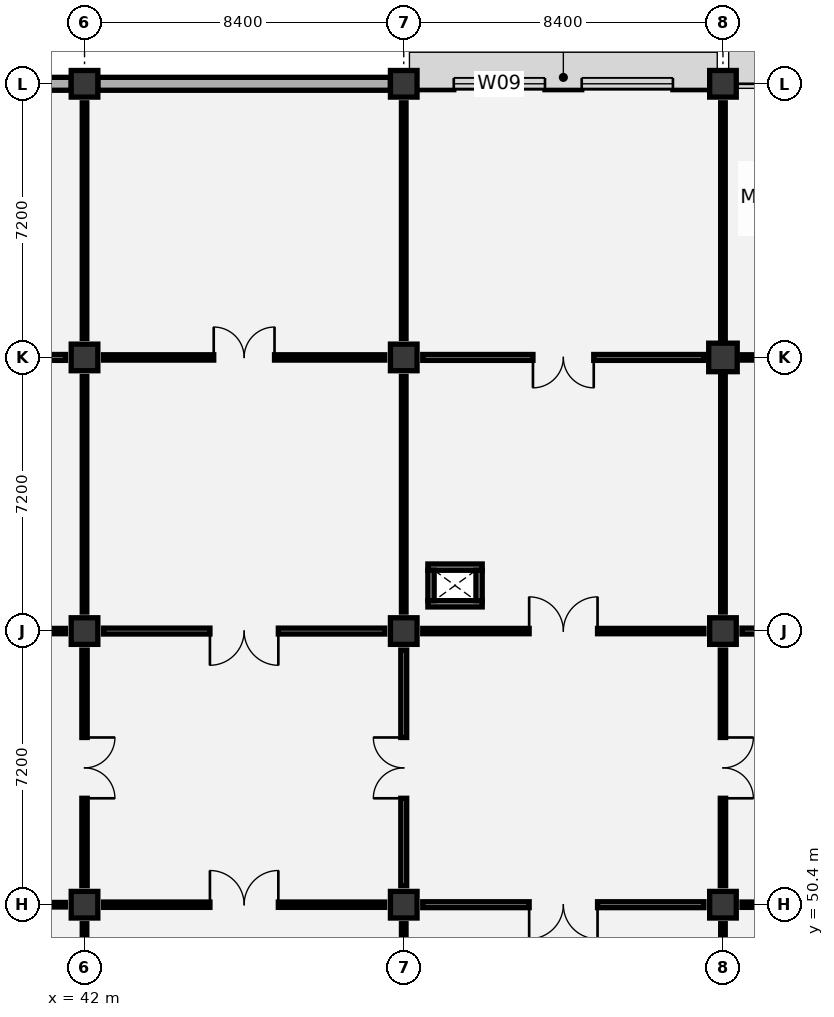
"""IFC4 building model, lengths in metres.
Left out: names, types, materials, properties, quantities, classifications, styles, units other than length and angle.
Written with IfcOpenShell. Run it as: python <this file> out.ifc"""

import sys

from ifc_helpers import new_model, si_unit, direction, frame, frame_2d, origin, origin_2d, place, context, subcontext, project, spatial, rectangle, circle, extrude, element, fill, save


model = new_model("IFC4")
c1 = context("Model", 3, precision=1e-05, world=origin(), true_north=direction((0.0, 1.0)))
c2 = subcontext(c1, "Body", "Model", "MODEL_VIEW")
j1 = project(units=[si_unit("LENGTHUNIT", "METRE"), si_unit("PLANEANGLEUNIT", "RADIAN")], contexts=[c1])
p1 = place(None, origin())
s1 = spatial("IfcSite", under=j1, at=p1, CompositionType="ELEMENT")
p2 = place(p1, origin())
s2 = spatial("IfcBuilding", under=s1, at=p2, CompositionType="ELEMENT")
p3 = place(p2, frame((0.0, 0.0, 6.0)))
s3 = spatial("IfcBuildingStorey", under=s2, at=p3, CompositionType="ELEMENT", Elevation=6.0)
for number, where, z_axis, x_axis in (
    (1, (42.0, 50.4, 0.0), (0.0, 0.0, 1.0), (1.0, 0.0, 0.0)),
    (2, (42.0, 57.6, 0.0), (0.0, 0.0, 1.0), (1.0, 0.0, 0.0)),
    (3, (42.0, 64.8, 0.0), (0.0, 0.0, 1.0), (1.0, 0.0, 0.0)),
    (4, (42.0, 72.0, 0.0), (0.0, 0.0, 1.0), (1.0, 0.0, 0.0)),
    (5, (50.4, 50.4, 0.0), (0.0, 0.0, 1.0), (1.0, 0.0, 0.0)),
    (6, (50.4, 57.6, 0.0), (0.0, 0.0, 1.0), (1.0, 0.0, 0.0)),
    (7, (50.4, 64.8, 0.0), (0.0, 0.0, 1.0), (1.0, 0.0, 0.0)),
    (8, (50.4, 72.0, 0.0), (0.0, 0.0, 1.0), (1.0, 0.0, 0.0)),
    (9, (58.8, 50.4, 0.0), (0.0, 0.0, 1.0), (1.0, 0.0, 0.0)),
    (10, (58.8, 57.6, 0.0), (0.0, 0.0, 1.0), (1.0, 0.0, 0.0)),
):
    element("IfcColumn", number, at=place(p3, frame(where, z_axis=z_axis, x_axis=x_axis)), inside=s3, PredefinedType="COLUMN", context=c2, shape_type="SweptSolid", body=[
        extrude(rectangle(XDim=0.7, YDim=0.7, at=origin_2d()), origin(), (0.0, 0.0, 1.0), 5.4),
    ])
p4 = place(p3, frame((58.8, 64.8, 0.0), z_axis=(0.0, 0.0, 1.0), x_axis=(1.0, 0.0, 0.0)))
e11 = element("IfcColumn", 11, at=p4, inside=s3, PredefinedType="COLUMN", context=c2, shape_type="SweptSolid", body=[
    extrude(circle(Radius=0.375, at=origin_2d()), origin(), (0.0, 0.0, 1.0), 5.4),
])
p5 = place(p3, frame((58.8, 72.0, 0.0), z_axis=(0.0, 0.0, 1.0), x_axis=(1.0, 0.0, 0.0)))
e12 = element("IfcColumn", 12, at=p5, inside=s3, PredefinedType="COLUMN", context=c2, shape_type="SweptSolid", body=[
    extrude(rectangle(XDim=0.7, YDim=0.7, at=origin_2d()), origin(), (0.0, 0.0, 1.0), 5.4),
])
for number, where, z_axis, x_axis in (
    (13, (33.95, 72.0, 0.0), (0.0, 0.0, 1.0), (1.0, 0.0, 0.0)),
    (14, (42.35, 72.0, 0.0), (0.0, 0.0, 1.0), (1.0, 0.0, 0.0)),
):
    element("IfcWall", number, at=place(p3, frame(where, z_axis=z_axis, x_axis=x_axis)), inside=s3, PredefinedType="SOLIDWALL", context=c2, shape_type="SweptSolid", body=[
        extrude(rectangle(XDim=7.7, YDim=0.34, at=frame_2d((3.85, 0.0))), origin(), (0.0, 0.0, 1.0), 4.42),
    ])
p6 = place(p3, frame((50.75, 72.0, 0.0), z_axis=(0.0, 0.0, 1.0), x_axis=(1.0, 0.0, 0.0)))
e15 = element("IfcWall", 15, at=p6, inside=s3, PredefinedType="SOLIDWALL", context=c2, shape_type="SweptSolid", body=[
    extrude(rectangle(XDim=7.7, YDim=0.31, at=frame_2d((3.85, 0.0))), origin(), (0.0, 0.0, 1.0), 4.42),
])
p7 = place(p6, frame((0.967, 0.0, 0.9)))
e16 = element("IfcOpeningElement", 16, at=p7, cuts=e15, PredefinedType="OPENING", context=c2, shape_type="SweptSolid", body=[
    extrude(rectangle(XDim=2.4, YDim=2.1, at=frame_2d((1.2, 1.05))), frame((0.0, 0.165, 0.0), z_axis=(0.0, -1.0, 0.0), x_axis=(1.0, 0.0, 0.0)), (0.0, 0.0, 1.0), 0.33),
])
p8 = place(p6, frame((4.333, 0.0, 0.9)))
e17 = element("IfcOpeningElement", 17, at=p8, cuts=e15, PredefinedType="OPENING", context=c2, shape_type="SweptSolid", body=[
    extrude(rectangle(XDim=2.4, YDim=2.1, at=frame_2d((1.2, 1.05))), frame((0.0, 0.165, 0.0), z_axis=(0.0, -1.0, 0.0), x_axis=(1.0, 0.0, 0.0)), (0.0, 0.0, 1.0), 0.33),
])
for number, where, z_axis, x_axis in (
    (18, (51.035, 58.317, 0.0), (0.0, 0.0, 1.0), (1.0, 0.0, 0.0)),
    (19, (51.035, 59.282, 0.0), (0.0, 0.0, 1.0), (1.0, 0.0, 0.0)),
):
    element("IfcWall", number, at=place(p3, frame(where, z_axis=z_axis, x_axis=x_axis)), inside=s3, PredefinedType="PARTITIONING", context=c2, shape_type="SweptSolid", body=[
        extrude(rectangle(XDim=1.43, YDim=0.165, at=frame_2d((0.715, 0.0))), origin(), (0.0, 0.0, 1.0), 5.075),
    ])
for number, where, z_axis, x_axis in (
    (20, (51.117, 58.4, 0.0), (0.0, 0.0, 1.0), (0.0, 1.0, 0.0)),
    (21, (52.383, 58.4, 0.0), (0.0, 0.0, 1.0), (0.0, 1.0, 0.0)),
):
    element("IfcWall", number, at=place(p3, frame(where, z_axis=z_axis, x_axis=x_axis)), inside=s3, PredefinedType="PARTITIONING", context=c2, shape_type="SweptSolid", body=[
        extrude(rectangle(XDim=0.8, YDim=0.165, at=frame_2d((0.4, 0.0))), origin(), (0.0, 0.0, 1.0), 5.075),
    ])
p9 = place(p3, frame((42.0, 43.7, 0.0), z_axis=(0.0, 0.0, 1.0), x_axis=(0.0, 1.0, 0.0)))
e22 = element("IfcWall", 22, at=p9, inside=s3, PredefinedType="PARTITIONING", context=c2, shape_type="SweptSolid", body=[
    extrude(rectangle(XDim=6.2, YDim=0.12, at=frame_2d((3.1, 0.0))), origin(), (0.0, 0.0, 1.0), 4.67),
])
p10 = place(p3, frame((34.1, 50.4, 0.0), z_axis=(0.0, 0.0, 1.0), x_axis=(1.0, 0.0, 0.0)))
e23 = element("IfcWall", 23, at=p10, inside=s3, PredefinedType="PARTITIONING", context=c2, shape_type="SweptSolid", body=[
    extrude(rectangle(XDim=7.4, YDim=0.12, at=frame_2d((3.7, 0.0))), origin(), (0.0, 0.0, 1.0), 4.27),
])
p11 = place(p3, frame((42.0, 50.9, 0.0), z_axis=(0.0, 0.0, 1.0), x_axis=(0.0, 1.0, 0.0)))
e24 = element("IfcWall", 24, at=p11, inside=s3, PredefinedType="PARTITIONING", context=c2, shape_type="SweptSolid", body=[
    extrude(rectangle(XDim=6.2, YDim=0.14, at=frame_2d((3.1, 0.0))), origin(), (0.0, 0.0, 1.0), 4.32),
])
p12 = place(p11, frame((2.3, 0.0, 0.0)))
e25 = element("IfcOpeningElement", 25, at=p12, cuts=e24, PredefinedType="OPENING", context=c2, shape_type="SweptSolid", body=[
    extrude(rectangle(XDim=1.6, YDim=2.2, at=frame_2d((0.8, 1.1))), frame((0.0, 0.08, 0.0), z_axis=(0.0, -1.0, 0.0), x_axis=(1.0, 0.0, 0.0)), (0.0, 0.0, 1.0), 0.16),
])
p13 = place(p3, frame((34.1, 57.6, 0.0), z_axis=(0.0, 0.0, 1.0), x_axis=(1.0, 0.0, 0.0)))
e26 = element("IfcWall", 26, at=p13, inside=s3, PredefinedType="PARTITIONING", context=c2, shape_type="SweptSolid", body=[
    extrude(rectangle(XDim=7.4, YDim=0.14, at=frame_2d((3.7, 0.0))), origin(), (0.0, 0.0, 1.0), 4.27),
])
p14 = place(p13, frame((2.8, 0.0, 0.0)))
e27 = element("IfcOpeningElement", 27, at=p14, cuts=e26, PredefinedType="OPENING", context=c2, shape_type="SweptSolid", body=[
    extrude(rectangle(XDim=1.8, YDim=2.25, at=frame_2d((0.9, 1.125))), frame((0.0, 0.08, 0.0), z_axis=(0.0, -1.0, 0.0), x_axis=(1.0, 0.0, 0.0)), (0.0, 0.0, 1.0), 0.16),
])
p15 = place(p3, frame((42.0, 58.1, 0.0), z_axis=(0.0, 0.0, 1.0), x_axis=(0.0, 1.0, 0.0)))
e28 = element("IfcWall", 28, at=p15, inside=s3, PredefinedType="PARTITIONING", context=c2, shape_type="SweptSolid", body=[
    extrude(rectangle(XDim=6.2, YDim=0.12, at=frame_2d((3.1, 0.0))), origin(), (0.0, 0.0, 1.0), 4.78),
])
p16 = place(p3, frame((34.1, 64.8, 0.0), z_axis=(0.0, 0.0, 1.0), x_axis=(1.0, 0.0, 0.0)))
e29 = element("IfcWall", 29, at=p16, inside=s3, PredefinedType="PARTITIONING", context=c2, shape_type="SweptSolid", body=[
    extrude(rectangle(XDim=7.4, YDim=0.155, at=frame_2d((3.7, 0.0))), origin(), (0.0, 0.0, 1.0), 4.27),
])
p17 = place(p16, frame((2.9, 0.0, 0.0)))
e30 = element("IfcOpeningElement", 30, at=p17, cuts=e29, PredefinedType="OPENING", context=c2, shape_type="SweptSolid", body=[
    extrude(rectangle(XDim=1.6, YDim=2.2, at=frame_2d((0.8, 1.1))), frame((0.0, 0.087, 0.0), z_axis=(0.0, -1.0, 0.0), x_axis=(1.0, 0.0, 0.0)), (0.0, 0.0, 1.0), 0.175),
])
for number, where, z_axis, x_axis in (
    (31, (42.0, 65.3, 0.0), (0.0, 0.0, 1.0), (0.0, 1.0, 0.0)),
    (32, (50.4, 43.7, 0.0), (0.0, 0.0, 1.0), (0.0, 1.0, 0.0)),
):
    element("IfcWall", number, at=place(p3, frame(where, z_axis=z_axis, x_axis=x_axis)), inside=s3, PredefinedType="PARTITIONING", context=c2, shape_type="SweptSolid", body=[
        extrude(rectangle(XDim=6.2, YDim=0.12, at=frame_2d((3.1, 0.0))), origin(), (0.0, 0.0, 1.0), 4.32),
    ])
p18 = place(p3, frame((42.5, 50.4, 0.0), z_axis=(0.0, 0.0, 1.0), x_axis=(1.0, 0.0, 0.0)))
e33 = element("IfcWall", 33, at=p18, inside=s3, PredefinedType="PARTITIONING", context=c2, shape_type="SweptSolid", body=[
    extrude(rectangle(XDim=7.4, YDim=0.14, at=frame_2d((3.7, 0.0))), origin(), (0.0, 0.0, 1.0), 4.27),
])
p19 = place(p18, frame((2.8, 0.0, 0.0)))
e34 = element("IfcOpeningElement", 34, at=p19, cuts=e33, PredefinedType="OPENING", context=c2, shape_type="SweptSolid", body=[
    extrude(rectangle(XDim=1.8, YDim=2.25, at=frame_2d((0.9, 1.125))), frame((0.0, 0.08, 0.0), z_axis=(0.0, -1.0, 0.0), x_axis=(1.0, 0.0, 0.0)), (0.0, 0.0, 1.0), 0.16),
])
p20 = place(p3, frame((50.4, 50.9, 0.0), z_axis=(0.0, 0.0, 1.0), x_axis=(0.0, 1.0, 0.0)))
e35 = element("IfcWall", 35, at=p20, inside=s3, PredefinedType="PARTITIONING", context=c2, shape_type="SweptSolid", body=[
    extrude(rectangle(XDim=6.2, YDim=0.155, at=frame_2d((3.1, 0.0))), origin(), (0.0, 0.0, 1.0), 4.78),
])
p21 = place(p20, frame((2.3, 0.0, 0.0)))
e36 = element("IfcOpeningElement", 36, at=p21, cuts=e35, PredefinedType="OPENING", context=c2, shape_type="SweptSolid", body=[
    extrude(rectangle(XDim=1.6, YDim=2.2, at=frame_2d((0.8, 1.1))), frame((0.0, 0.087, 0.0), z_axis=(0.0, -1.0, 0.0), x_axis=(1.0, 0.0, 0.0)), (0.0, 0.0, 1.0), 0.175),
])
p22 = place(p3, frame((42.5, 57.6, 0.0), z_axis=(0.0, 0.0, 1.0), x_axis=(1.0, 0.0, 0.0)))
e37 = element("IfcWall", 37, at=p22, inside=s3, PredefinedType="PARTITIONING", context=c2, shape_type="SweptSolid", body=[
    extrude(rectangle(XDim=7.4, YDim=0.155, at=frame_2d((3.7, 0.0))), origin(), (0.0, 0.0, 1.0), 4.27),
])
p23 = place(p22, frame((2.8, 0.0, 0.0)))
e38 = element("IfcOpeningElement", 38, at=p23, cuts=e37, PredefinedType="OPENING", context=c2, shape_type="SweptSolid", body=[
    extrude(rectangle(XDim=1.8, YDim=2.25, at=frame_2d((0.9, 1.125))), frame((0.0, 0.087, 0.0), z_axis=(0.0, -1.0, 0.0), x_axis=(1.0, 0.0, 0.0)), (0.0, 0.0, 1.0), 0.175),
])
p24 = place(p3, frame((50.4, 58.1, 0.0), z_axis=(0.0, 0.0, 1.0), x_axis=(0.0, 1.0, 0.0)))
e39 = element("IfcWall", 39, at=p24, inside=s3, PredefinedType="PARTITIONING", context=c2, shape_type="SweptSolid", body=[
    extrude(rectangle(XDim=6.2, YDim=0.12, at=frame_2d((3.1, 0.0))), origin(), (0.0, 0.0, 1.0), 4.32),
])
p25 = place(p3, frame((42.5, 64.8, 0.0), z_axis=(0.0, 0.0, 1.0), x_axis=(1.0, 0.0, 0.0)))
e40 = element("IfcWall", 40, at=p25, inside=s3, PredefinedType="PARTITIONING", context=c2, shape_type="SweptSolid", body=[
    extrude(rectangle(XDim=7.4, YDim=0.14, at=frame_2d((3.7, 0.0))), origin(), (0.0, 0.0, 1.0), 4.27),
])
p26 = place(p25, frame((2.9, 0.0, 0.0)))
e41 = element("IfcOpeningElement", 41, at=p26, cuts=e40, PredefinedType="OPENING", context=c2, shape_type="SweptSolid", body=[
    extrude(rectangle(XDim=1.6, YDim=2.2, at=frame_2d((0.8, 1.1))), frame((0.0, 0.08, 0.0), z_axis=(0.0, -1.0, 0.0), x_axis=(1.0, 0.0, 0.0)), (0.0, 0.0, 1.0), 0.16),
])
p27 = place(p3, frame((50.4, 65.3, 0.0), z_axis=(0.0, 0.0, 1.0), x_axis=(0.0, 1.0, 0.0)))
e42 = element("IfcWall", 42, at=p27, inside=s3, PredefinedType="PARTITIONING", context=c2, shape_type="SweptSolid", body=[
    extrude(rectangle(XDim=6.2, YDim=0.12, at=frame_2d((3.1, 0.0))), origin(), (0.0, 0.0, 1.0), 4.57),
])
p28 = place(p3, frame((58.8, 43.7, 0.0), z_axis=(0.0, 0.0, 1.0), x_axis=(0.0, 1.0, 0.0)))
e43 = element("IfcWall", 43, at=p28, inside=s3, PredefinedType="PARTITIONING", context=c2, shape_type="SweptSolid", body=[
    extrude(rectangle(XDim=6.2, YDim=0.12, at=frame_2d((3.1, 0.0))), origin(), (0.0, 0.0, 1.0), 4.78),
])
p29 = place(p3, frame((50.9, 50.4, 0.0), z_axis=(0.0, 0.0, 1.0), x_axis=(1.0, 0.0, 0.0)))
e44 = element("IfcWall", 44, at=p29, inside=s3, PredefinedType="PARTITIONING", context=c2, shape_type="SweptSolid", body=[
    extrude(rectangle(XDim=7.4, YDim=0.155, at=frame_2d((3.7, 0.0))), origin(), (0.0, 0.0, 1.0), 4.27),
])
p30 = place(p29, frame((2.8, 0.0, 0.0)))
e45 = element("IfcOpeningElement", 45, at=p30, cuts=e44, PredefinedType="OPENING", context=c2, shape_type="SweptSolid", body=[
    extrude(rectangle(XDim=1.8, YDim=2.25, at=frame_2d((0.9, 1.125))), frame((0.0, 0.087, 0.0), z_axis=(0.0, -1.0, 0.0), x_axis=(1.0, 0.0, 0.0)), (0.0, 0.0, 1.0), 0.175),
])
p31 = place(p3, frame((58.8, 50.9, 0.0), z_axis=(0.0, 0.0, 1.0), x_axis=(0.0, 1.0, 0.0)))
e46 = element("IfcWall", 46, at=p31, inside=s3, PredefinedType="PARTITIONING", context=c2, shape_type="SweptSolid", body=[
    extrude(rectangle(XDim=6.2, YDim=0.14, at=frame_2d((3.1, 0.0))), origin(), (0.0, 0.0, 1.0), 4.32),
])
p32 = place(p31, frame((2.3, 0.0, 0.0)))
e47 = element("IfcOpeningElement", 47, at=p32, cuts=e46, PredefinedType="OPENING", context=c2, shape_type="SweptSolid", body=[
    extrude(rectangle(XDim=1.6, YDim=2.2, at=frame_2d((0.8, 1.1))), frame((0.0, 0.08, 0.0), z_axis=(0.0, -1.0, 0.0), x_axis=(1.0, 0.0, 0.0)), (0.0, 0.0, 1.0), 0.16),
])
p33 = place(p3, frame((50.9, 57.6, 0.0), z_axis=(0.0, 0.0, 1.0), x_axis=(1.0, 0.0, 0.0)))
e48 = element("IfcWall", 48, at=p33, inside=s3, PredefinedType="PARTITIONING", context=c2, shape_type="SweptSolid", body=[
    extrude(rectangle(XDim=7.4, YDim=0.14, at=frame_2d((3.7, 0.0))), origin(), (0.0, 0.0, 1.0), 4.27),
])
p34 = place(p33, frame((2.8, 0.0, 0.0)))
e49 = element("IfcOpeningElement", 49, at=p34, cuts=e48, PredefinedType="OPENING", context=c2, shape_type="SweptSolid", body=[
    extrude(rectangle(XDim=1.8, YDim=2.25, at=frame_2d((0.9, 1.125))), frame((0.0, 0.08, 0.0), z_axis=(0.0, -1.0, 0.0), x_axis=(1.0, 0.0, 0.0)), (0.0, 0.0, 1.0), 0.16),
])
p35 = place(p3, frame((58.8, 58.1, 0.0), z_axis=(0.0, 0.0, 1.0), x_axis=(0.0, 1.0, 0.0)))
e50 = element("IfcWall", 50, at=p35, inside=s3, PredefinedType="PARTITIONING", context=c2, shape_type="SweptSolid", body=[
    extrude(rectangle(XDim=6.2, YDim=0.12, at=frame_2d((3.1, 0.0))), origin(), (0.0, 0.0, 1.0), 4.57),
])
p36 = place(p3, frame((50.9, 64.8, 0.0), z_axis=(0.0, 0.0, 1.0), x_axis=(1.0, 0.0, 0.0)))
e51 = element("IfcWall", 51, at=p36, inside=s3, PredefinedType="PARTITIONING", context=c2, shape_type="SweptSolid", body=[
    extrude(rectangle(XDim=7.4, YDim=0.155, at=frame_2d((3.7, 0.0))), origin(), (0.0, 0.0, 1.0), 4.27),
])
p37 = place(p36, frame((2.9, 0.0, 0.0)))
e52 = element("IfcOpeningElement", 52, at=p37, cuts=e51, PredefinedType="OPENING", context=c2, shape_type="SweptSolid", body=[
    extrude(rectangle(XDim=1.6, YDim=2.2, at=frame_2d((0.8, 1.1))), frame((0.0, 0.087, 0.0), z_axis=(0.0, -1.0, 0.0), x_axis=(1.0, 0.0, 0.0)), (0.0, 0.0, 1.0), 0.175),
])
p38 = place(p3, frame((58.8, 65.3, 0.0), z_axis=(0.0, 0.0, 1.0), x_axis=(0.0, 1.0, 0.0)))
e53 = element("IfcWall", 53, at=p38, inside=s3, PredefinedType="PARTITIONING", context=c2, shape_type="SweptSolid", body=[
    extrude(rectangle(XDim=6.2, YDim=0.12, at=frame_2d((3.1, 0.0))), origin(), (0.0, 0.0, 1.0), 4.32),
])
p39 = place(p3, frame((59.3, 50.4, 0.0), z_axis=(0.0, 0.0, 1.0), x_axis=(1.0, 0.0, 0.0)))
e54 = element("IfcWall", 54, at=p39, inside=s3, PredefinedType="PARTITIONING", context=c2, shape_type="SweptSolid", body=[
    extrude(rectangle(XDim=7.4, YDim=0.14, at=frame_2d((3.7, 0.0))), origin(), (0.0, 0.0, 1.0), 4.27),
])
p40 = place(p39, frame((2.9, 0.0, 0.0)))
e55 = element("IfcOpeningElement", 55, at=p40, cuts=e54, PredefinedType="OPENING", context=c2, shape_type="SweptSolid", body=[
    extrude(rectangle(XDim=1.6, YDim=2.2, at=frame_2d((0.8, 1.1))), frame((0.0, 0.08, 0.0), z_axis=(0.0, -1.0, 0.0), x_axis=(1.0, 0.0, 0.0)), (0.0, 0.0, 1.0), 0.16),
])
p41 = place(p3, frame((59.3, 57.6, 0.0), z_axis=(0.0, 0.0, 1.0), x_axis=(1.0, 0.0, 0.0)))
e56 = element("IfcWall", 56, at=p41, inside=s3, PredefinedType="PARTITIONING", context=c2, shape_type="SweptSolid", body=[
    extrude(rectangle(XDim=7.4, YDim=0.155, at=frame_2d((3.7, 0.0))), origin(), (0.0, 0.0, 1.0), 4.27),
])
p42 = place(p41, frame((2.9, 0.0, 0.0)))
e57 = element("IfcOpeningElement", 57, at=p42, cuts=e56, PredefinedType="OPENING", context=c2, shape_type="SweptSolid", body=[
    extrude(rectangle(XDim=1.6, YDim=2.2, at=frame_2d((0.8, 1.1))), frame((0.0, 0.087, 0.0), z_axis=(0.0, -1.0, 0.0), x_axis=(1.0, 0.0, 0.0)), (0.0, 0.0, 1.0), 0.175),
])
p43 = place(p3, frame((59.3, 64.8, 0.0), z_axis=(0.0, 0.0, 1.0), x_axis=(1.0, 0.0, 0.0)))
e58 = element("IfcWall", 58, at=p43, inside=s3, PredefinedType="PARTITIONING", context=c2, shape_type="SweptSolid", body=[
    extrude(rectangle(XDim=7.4, YDim=0.14, at=frame_2d((3.7, 0.0))), origin(), (0.0, 0.0, 1.0), 4.27),
])
p44 = place(p43, frame((2.8, 0.0, 0.0)))
e59 = element("IfcOpeningElement", 59, at=p44, cuts=e58, PredefinedType="OPENING", context=c2, shape_type="SweptSolid", body=[
    extrude(rectangle(XDim=1.8, YDim=2.25, at=frame_2d((0.9, 1.125))), frame((0.0, 0.08, 0.0), z_axis=(0.0, -1.0, 0.0), x_axis=(1.0, 0.0, 0.0)), (0.0, 0.0, 1.0), 0.16),
])
p45 = place(p7, origin())
e60 = element("IfcWindow", 60, at=p45, inside=s3, PartitioningType="SINGLE_PANEL", PredefinedType="WINDOW", context=c2, shape_type="SweptSolid", body=[
    extrude(rectangle(XDim=2.4, YDim=2.1, at=frame_2d((1.2, 1.05))), frame((0.0, 0.03, 0.0), z_axis=(0.0, -1.0, 0.0), x_axis=(1.0, 0.0, 0.0)), (0.0, 0.0, 1.0), 0.06),
])
fill(e16, e60)
p46 = place(p8, origin())
e61 = element("IfcWindow", 61, at=p46, inside=s3, PartitioningType="SINGLE_PANEL", PredefinedType="WINDOW", context=c2, shape_type="SweptSolid", body=[
    extrude(rectangle(XDim=2.4, YDim=2.1, at=frame_2d((1.2, 1.05))), frame((0.0, 0.03, 0.0), z_axis=(0.0, -1.0, 0.0), x_axis=(1.0, 0.0, 0.0)), (0.0, 0.0, 1.0), 0.06),
])
fill(e17, e61)
p47 = place(p12, frame((1.6, 0.0, 0.0), z_axis=(0.0, 0.0, 1.0), x_axis=(-1.0, 0.0, 0.0)))
e62 = element("IfcDoor", 62, at=p47, inside=s3, OperationType="DOUBLE_DOOR_SINGLE_SWING", PredefinedType="DOOR", context=c2, shape_type="SweptSolid", body=[
    extrude(rectangle(XDim=1.6, YDim=2.2, at=frame_2d((0.8, 1.1))), frame((0.0, 0.025, 0.0), z_axis=(0.0, -1.0, 0.0), x_axis=(1.0, 0.0, 0.0)), (0.0, 0.0, 1.0), 0.05),
])
fill(e25, e62)
p48 = place(p19, origin())
e63 = element("IfcDoor", 63, at=p48, inside=s3, OperationType="DOUBLE_DOOR_SINGLE_SWING", PredefinedType="DOOR", context=c2, shape_type="SweptSolid", body=[
    extrude(rectangle(XDim=1.8, YDim=2.25, at=frame_2d((0.9, 1.125))), frame((0.0, 0.025, 0.0), z_axis=(0.0, -1.0, 0.0), x_axis=(1.0, 0.0, 0.0)), (0.0, 0.0, 1.0), 0.05),
])
fill(e34, e63)
p49 = place(p21, origin())
e64 = element("IfcDoor", 64, at=p49, inside=s3, OperationType="DOUBLE_DOOR_SINGLE_SWING", PredefinedType="DOOR", context=c2, shape_type="SweptSolid", body=[
    extrude(rectangle(XDim=1.6, YDim=2.2, at=frame_2d((0.8, 1.1))), frame((0.0, 0.025, 0.0), z_axis=(0.0, -1.0, 0.0), x_axis=(1.0, 0.0, 0.0)), (0.0, 0.0, 1.0), 0.05),
])
fill(e36, e64)
p50 = place(p23, frame((1.8, 0.0, 0.0), z_axis=(0.0, 0.0, 1.0), x_axis=(-1.0, 0.0, 0.0)))
e65 = element("IfcDoor", 65, at=p50, inside=s3, OperationType="DOUBLE_DOOR_SINGLE_SWING", PredefinedType="DOOR", context=c2, shape_type="SweptSolid", body=[
    extrude(rectangle(XDim=1.8, YDim=2.25, at=frame_2d((0.9, 1.125))), frame((0.0, 0.025, 0.0), z_axis=(0.0, -1.0, 0.0), x_axis=(1.0, 0.0, 0.0)), (0.0, 0.0, 1.0), 0.05),
])
fill(e38, e65)
p51 = place(p26, origin())
e66 = element("IfcDoor", 66, at=p51, inside=s3, OperationType="DOUBLE_DOOR_SINGLE_SWING", PredefinedType="DOOR", context=c2, shape_type="SweptSolid", body=[
    extrude(rectangle(XDim=1.6, YDim=2.2, at=frame_2d((0.8, 1.1))), frame((0.0, 0.025, 0.0), z_axis=(0.0, -1.0, 0.0), x_axis=(1.0, 0.0, 0.0)), (0.0, 0.0, 1.0), 0.05),
])
fill(e41, e66)
p52 = place(p30, frame((1.8, 0.0, 0.0), z_axis=(0.0, 0.0, 1.0), x_axis=(-1.0, 0.0, 0.0)))
e67 = element("IfcDoor", 67, at=p52, inside=s3, OperationType="DOUBLE_DOOR_SINGLE_SWING", PredefinedType="DOOR", context=c2, shape_type="SweptSolid", body=[
    extrude(rectangle(XDim=1.8, YDim=2.25, at=frame_2d((0.9, 1.125))), frame((0.0, 0.025, 0.0), z_axis=(0.0, -1.0, 0.0), x_axis=(1.0, 0.0, 0.0)), (0.0, 0.0, 1.0), 0.05),
])
fill(e45, e67)
p53 = place(p32, frame((1.6, 0.0, 0.0), z_axis=(0.0, 0.0, 1.0), x_axis=(-1.0, 0.0, 0.0)))
e68 = element("IfcDoor", 68, at=p53, inside=s3, OperationType="DOUBLE_DOOR_SINGLE_SWING", PredefinedType="DOOR", context=c2, shape_type="SweptSolid", body=[
    extrude(rectangle(XDim=1.6, YDim=2.2, at=frame_2d((0.8, 1.1))), frame((0.0, 0.025, 0.0), z_axis=(0.0, -1.0, 0.0), x_axis=(1.0, 0.0, 0.0)), (0.0, 0.0, 1.0), 0.05),
])
fill(e47, e68)
p54 = place(p34, origin())
e69 = element("IfcDoor", 69, at=p54, inside=s3, OperationType="DOUBLE_DOOR_SINGLE_SWING", PredefinedType="DOOR", context=c2, shape_type="SweptSolid", body=[
    extrude(rectangle(XDim=1.8, YDim=2.25, at=frame_2d((0.9, 1.125))), frame((0.0, 0.025, 0.0), z_axis=(0.0, -1.0, 0.0), x_axis=(1.0, 0.0, 0.0)), (0.0, 0.0, 1.0), 0.05),
])
fill(e49, e69)
p55 = place(p37, frame((1.6, 0.0, 0.0), z_axis=(0.0, 0.0, 1.0), x_axis=(-1.0, 0.0, 0.0)))
e70 = element("IfcDoor", 70, at=p55, inside=s3, OperationType="DOUBLE_DOOR_SINGLE_SWING", PredefinedType="DOOR", context=c2, shape_type="SweptSolid", body=[
    extrude(rectangle(XDim=1.6, YDim=2.2, at=frame_2d((0.8, 1.1))), frame((0.0, 0.025, 0.0), z_axis=(0.0, -1.0, 0.0), x_axis=(1.0, 0.0, 0.0)), (0.0, 0.0, 1.0), 0.05),
])
fill(e52, e70)
save(model, sys.argv[1])
